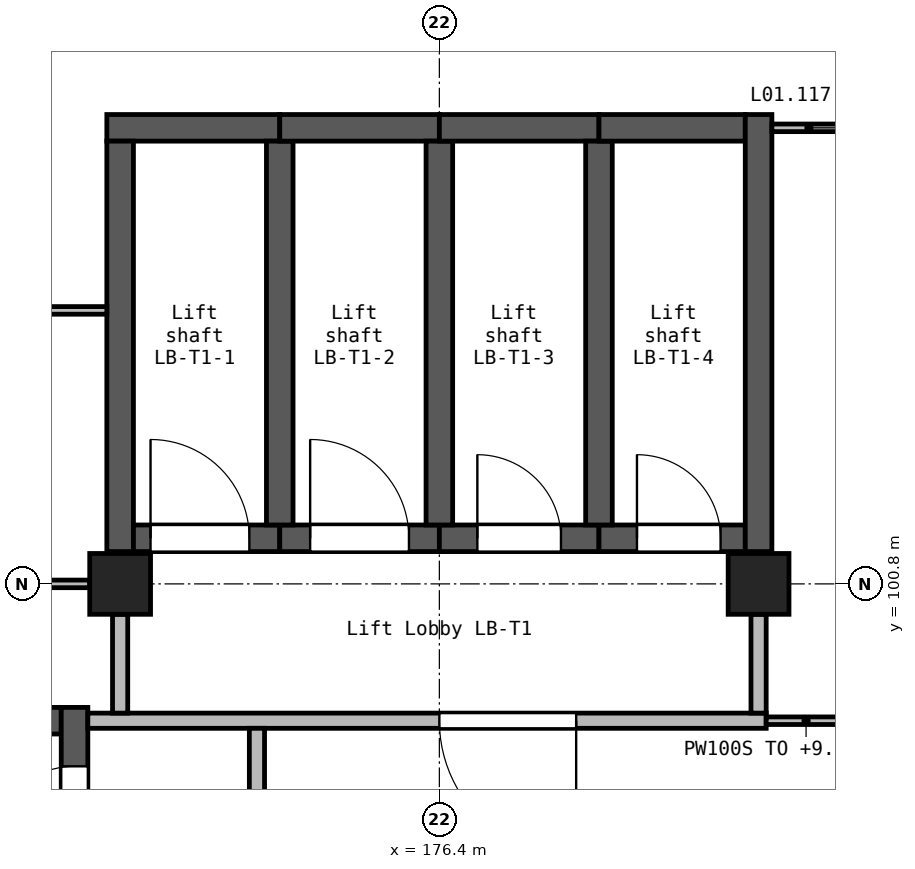
"""IFC4 building model, lengths in metres.
Left out: names, types, materials, properties, quantities, classifications, styles, units other than length and angle.
Written with IfcOpenShell. Run it as: python <this file> out.ifc"""

import sys

from ifc_helpers import new_model, si_unit, direction, frame, frame_2d, origin, origin_2d, place, context, subcontext, project, spatial, rectangle, extrude, element, fill, save


model = new_model("IFC4")
c1 = context("Model", 3, precision=1e-05, world=origin(), true_north=direction((0.0, 1.0)))
c2 = subcontext(c1, "Body", "Model", "MODEL_VIEW")
j1 = project(units=[si_unit("LENGTHUNIT", "METRE"), si_unit("PLANEANGLEUNIT", "RADIAN")], contexts=[c1])
p1 = place(None, origin())
s1 = spatial("IfcSite", under=j1, at=p1, CompositionType="ELEMENT")
p2 = place(p1, origin())
s2 = spatial("IfcBuilding", under=s1, at=p2, CompositionType="ELEMENT")
p3 = place(p2, frame((0.0, 0.0, 5.4)))
s3 = spatial("IfcBuildingStorey", under=s2, at=p3, CompositionType="ELEMENT", Elevation=5.4)
for number, where, z_axis, x_axis in (
    (1, (172.2, 100.8, 0.0), (0.0, 0.0, 1.0), (1.0, 0.0, 0.0)),
    (2, (180.6, 100.8, 0.0), (0.0, 0.0, 1.0), (1.0, 0.0, 0.0)),
):
    element("IfcColumn", number, at=place(p3, frame(where, z_axis=z_axis, x_axis=x_axis)), inside=s3, PredefinedType="COLUMN", context=c2, shape_type="SweptSolid", body=[
        extrude(rectangle(XDim=0.8, YDim=0.8, at=origin_2d()), origin(), (0.0, 0.0, 1.0), 4.5),
    ])
p4 = place(p3, frame((163.625, 99.0, 0.0), z_axis=(0.0, 0.0, 1.0), x_axis=(1.0, 0.0, 0.0)))
e3 = element("IfcWall", 3, at=p4, inside=s3, PredefinedType="SHEAR", context=c2, shape_type="SweptSolid", body=[
    extrude(rectangle(XDim=7.8, YDim=0.35, at=frame_2d((3.9, 0.0))), origin(), (0.0, 0.0, 1.0), 4.5),
])
p5 = place(p3, frame((171.6, 94.025, 0.0), z_axis=(0.0, 0.0, 1.0), x_axis=(0.0, 1.0, 0.0)))
e4 = element("IfcWall", 4, at=p5, inside=s3, PredefinedType="SHEAR", context=c2, shape_type="SweptSolid", body=[
    extrude(rectangle(XDim=5.15, YDim=0.35, at=frame_2d((2.575, 0.0))), origin(), (0.0, 0.0, 1.0), 4.5),
])
p6 = place(p5, frame((3.275, 0.0, 0.0)))
e5 = element("IfcOpeningElement", 5, at=p6, cuts=e4, PredefinedType="OPENING", context=c2, shape_type="SweptSolid", body=[
    extrude(rectangle(XDim=1.1, YDim=2.1, at=frame_2d((0.55, 1.05))), frame((0.0, 0.185, 0.0), z_axis=(0.0, -1.0, 0.0), x_axis=(1.0, 0.0, 0.0)), (0.0, 0.0, 1.0), 0.37),
])
p7 = place(p3, frame((172.025, 106.8, 0.0), z_axis=(0.0, 0.0, 1.0), x_axis=(1.0, 0.0, 0.0)))
e6 = element("IfcWall", 6, at=p7, inside=s3, PredefinedType="SHEAR", context=c2, shape_type="SweptSolid", body=[
    extrude(rectangle(XDim=2.275, YDim=0.35, at=frame_2d((1.138, 0.0))), origin(), (0.0, 0.0, 1.0), 4.5),
])
p8 = place(p3, frame((172.2, 101.225, 0.0), z_axis=(0.0, 0.0, 1.0), x_axis=(0.0, 1.0, 0.0)))
e7 = element("IfcWall", 7, at=p8, inside=s3, PredefinedType="SHEAR", context=c2, shape_type="SweptSolid", body=[
    extrude(rectangle(XDim=5.4, YDim=0.35, at=frame_2d((2.7, 0.0))), origin(), (0.0, 0.0, 1.0), 4.5),
])
p9 = place(p3, frame((172.375, 101.4, 0.0), z_axis=(0.0, 0.0, 1.0), x_axis=(1.0, 0.0, 0.0)))
e8 = element("IfcWall", 8, at=p9, inside=s3, PredefinedType="SHEAR", context=c2, shape_type="SweptSolid", body=[
    extrude(rectangle(XDim=1.925, YDim=0.35, at=frame_2d((0.962, 0.0))), origin(), (0.0, 0.0, 1.0), 4.5),
])
p10 = place(p9, frame((0.225, 0.0, 0.0)))
e9 = element("IfcOpeningElement", 9, at=p10, cuts=e8, PredefinedType="OPENING", context=c2, shape_type="SweptSolid", body=[
    extrude(rectangle(XDim=1.3, YDim=2.1, at=frame_2d((0.65, 1.05))), frame((0.0, 0.185, 0.0), z_axis=(0.0, -1.0, 0.0), x_axis=(1.0, 0.0, 0.0)), (0.0, 0.0, 1.0), 0.37),
])
p11 = place(p3, frame((174.3, 101.4, 0.0), z_axis=(0.0, 0.0, 1.0), x_axis=(1.0, 0.0, 0.0)))
e10 = element("IfcWall", 10, at=p11, inside=s3, PredefinedType="SHEAR", context=c2, shape_type="SweptSolid", body=[
    extrude(rectangle(XDim=2.1, YDim=0.35, at=frame_2d((1.05, 0.0))), origin(), (0.0, 0.0, 1.0), 4.5),
])
p12 = place(p11, frame((0.4, 0.0, 0.0)))
e11 = element("IfcOpeningElement", 11, at=p12, cuts=e10, PredefinedType="OPENING", context=c2, shape_type="SweptSolid", body=[
    extrude(rectangle(XDim=1.3, YDim=2.1, at=frame_2d((0.65, 1.05))), frame((0.0, 0.185, 0.0), z_axis=(0.0, -1.0, 0.0), x_axis=(1.0, 0.0, 0.0)), (0.0, 0.0, 1.0), 0.37),
])
p13 = place(p3, frame((174.3, 101.575, 0.0), z_axis=(0.0, 0.0, 1.0), x_axis=(0.0, 1.0, 0.0)))
e12 = element("IfcWall", 12, at=p13, inside=s3, PredefinedType="SHEAR", context=c2, shape_type="SweptSolid", body=[
    extrude(rectangle(XDim=5.05, YDim=0.35, at=frame_2d((2.525, 0.0))), origin(), (0.0, 0.0, 1.0), 4.5),
])
p14 = place(p3, frame((174.3, 106.8, 0.0), z_axis=(0.0, 0.0, 1.0), x_axis=(1.0, 0.0, 0.0)))
e13 = element("IfcWall", 13, at=p14, inside=s3, PredefinedType="SHEAR", context=c2, shape_type="SweptSolid", body=[
    extrude(rectangle(XDim=2.1, YDim=0.35, at=frame_2d((1.05, 0.0))), origin(), (0.0, 0.0, 1.0), 4.5),
])
p15 = place(p3, frame((176.4, 101.4, 0.0), z_axis=(0.0, 0.0, 1.0), x_axis=(1.0, 0.0, 0.0)))
e14 = element("IfcWall", 14, at=p15, inside=s3, PredefinedType="SHEAR", context=c2, shape_type="SweptSolid", body=[
    extrude(rectangle(XDim=2.1, YDim=0.35, at=frame_2d((1.05, 0.0))), origin(), (0.0, 0.0, 1.0), 4.5),
])
p16 = place(p15, frame((0.5, 0.0, 0.0)))
e15 = element("IfcOpeningElement", 15, at=p16, cuts=e14, PredefinedType="OPENING", context=c2, shape_type="SweptSolid", body=[
    extrude(rectangle(XDim=1.1, YDim=2.1, at=frame_2d((0.55, 1.05))), frame((0.0, 0.185, 0.0), z_axis=(0.0, -1.0, 0.0), x_axis=(1.0, 0.0, 0.0)), (0.0, 0.0, 1.0), 0.37),
])
p17 = place(p3, frame((176.4, 101.575, 0.0), z_axis=(0.0, 0.0, 1.0), x_axis=(0.0, 1.0, 0.0)))
e16 = element("IfcWall", 16, at=p17, inside=s3, PredefinedType="SHEAR", context=c2, shape_type="SweptSolid", body=[
    extrude(rectangle(XDim=5.05, YDim=0.35, at=frame_2d((2.525, 0.0))), origin(), (0.0, 0.0, 1.0), 4.5),
])
p18 = place(p3, frame((176.4, 106.8, 0.0), z_axis=(0.0, 0.0, 1.0), x_axis=(1.0, 0.0, 0.0)))
e17 = element("IfcWall", 17, at=p18, inside=s3, PredefinedType="SHEAR", context=c2, shape_type="SweptSolid", body=[
    extrude(rectangle(XDim=2.1, YDim=0.35, at=frame_2d((1.05, 0.0))), origin(), (0.0, 0.0, 1.0), 4.5),
])
p19 = place(p3, frame((178.5, 101.4, 0.0), z_axis=(0.0, 0.0, 1.0), x_axis=(1.0, 0.0, 0.0)))
e18 = element("IfcWall", 18, at=p19, inside=s3, PredefinedType="SHEAR", context=c2, shape_type="SweptSolid", body=[
    extrude(rectangle(XDim=1.925, YDim=0.35, at=frame_2d((0.962, 0.0))), origin(), (0.0, 0.0, 1.0), 4.5),
])
p20 = place(p19, frame((0.5, 0.0, 0.0)))
e19 = element("IfcOpeningElement", 19, at=p20, cuts=e18, PredefinedType="OPENING", context=c2, shape_type="SweptSolid", body=[
    extrude(rectangle(XDim=1.1, YDim=2.1, at=frame_2d((0.55, 1.05))), frame((0.0, 0.185, 0.0), z_axis=(0.0, -1.0, 0.0), x_axis=(1.0, 0.0, 0.0)), (0.0, 0.0, 1.0), 0.37),
])
p21 = place(p3, frame((178.5, 101.575, 0.0), z_axis=(0.0, 0.0, 1.0), x_axis=(0.0, 1.0, 0.0)))
e20 = element("IfcWall", 20, at=p21, inside=s3, PredefinedType="SHEAR", context=c2, shape_type="SweptSolid", body=[
    extrude(rectangle(XDim=5.05, YDim=0.35, at=frame_2d((2.525, 0.0))), origin(), (0.0, 0.0, 1.0), 4.5),
])
p22 = place(p3, frame((178.5, 106.8, 0.0), z_axis=(0.0, 0.0, 1.0), x_axis=(1.0, 0.0, 0.0)))
e21 = element("IfcWall", 21, at=p22, inside=s3, PredefinedType="SHEAR", context=c2, shape_type="SweptSolid", body=[
    extrude(rectangle(XDim=1.925, YDim=0.35, at=frame_2d((0.962, 0.0))), origin(), (0.0, 0.0, 1.0), 4.5),
])
p23 = place(p3, frame((180.6, 101.225, 0.0), z_axis=(0.0, 0.0, 1.0), x_axis=(0.0, 1.0, 0.0)))
e22 = element("IfcWall", 22, at=p23, inside=s3, PredefinedType="SHEAR", context=c2, shape_type="SweptSolid", body=[
    extrude(rectangle(XDim=5.75, YDim=0.35, at=frame_2d((2.875, 0.0))), origin(), (0.0, 0.0, 1.0), 4.5),
])
p24 = place(p3, frame((180.7, 99.0, 0.0), z_axis=(0.0, 0.0, 1.0), x_axis=(-1.0, 0.0, 0.0)))
e23 = element("IfcWall", 23, at=p24, inside=s3, PredefinedType="SOLIDWALL", context=c2, shape_type="SweptSolid", body=[
    extrude(rectangle(XDim=8.925, YDim=0.2, at=frame_2d((4.462, 0.0))), origin(), (0.0, 0.0, 1.0), 4.25),
])
p25 = place(p24, frame((2.5, 0.0, 0.0)))
e24 = element("IfcOpeningElement", 24, at=p25, cuts=e23, PredefinedType="OPENING", context=c2, shape_type="SweptSolid", body=[
    extrude(rectangle(XDim=1.8, YDim=2.1, at=frame_2d((0.9, 1.05))), frame((0.0, 0.11, 0.0), z_axis=(0.0, -1.0, 0.0), x_axis=(1.0, 0.0, 0.0)), (0.0, 0.0, 1.0), 0.22),
])
p26 = place(p3, frame((174.0, 94.1, 0.0), z_axis=(0.0, 0.0, 1.0), x_axis=(0.0, 1.0, 0.0)))
e25 = element("IfcWall", 25, at=p26, inside=s3, PredefinedType="SOLIDWALL", context=c2, shape_type="SweptSolid", body=[
    extrude(rectangle(XDim=4.8, YDim=0.2, at=frame_2d((2.4, 0.0))), origin(), (0.0, 0.0, 1.0), 4.25),
])
p27 = place(p26, frame((1.95, 0.0, 0.0)))
e26 = element("IfcOpeningElement", 26, at=p27, cuts=e25, PredefinedType="OPENING", context=c2, shape_type="SweptSolid", body=[
    extrude(rectangle(XDim=1.1, YDim=2.1, at=frame_2d((0.55, 1.05))), frame((0.0, 0.11, 0.0), z_axis=(0.0, -1.0, 0.0), x_axis=(1.0, 0.0, 0.0)), (0.0, 0.0, 1.0), 0.22),
])
for number, where, z_axis, x_axis in (
    (27, (172.2, 99.1, 0.0), (0.0, 0.0, 1.0), (0.0, 1.0, 0.0)),
    (28, (180.6, 99.1, 0.0), (0.0, 0.0, 1.0), (0.0, 1.0, 0.0)),
):
    element("IfcWall", number, at=place(p3, frame(where, z_axis=z_axis, x_axis=x_axis)), inside=s3, PredefinedType="SOLIDWALL", context=c2, shape_type="SweptSolid", body=[
        extrude(rectangle(XDim=1.3, YDim=0.2, at=frame_2d((0.65, 0.0))), origin(), (0.0, 0.0, 1.0), 4.25),
    ])
p28 = place(p3, frame((180.775, 106.8, 0.0), z_axis=(0.0, 0.0, 1.0), x_axis=(1.0, 0.0, 0.0)))
e29 = element("IfcWall", 29, at=p28, inside=s3, PredefinedType="PARTITIONING", context=c2, shape_type="SweptSolid", body=[
    extrude(rectangle(XDim=0.975, YDim=0.1, at=frame_2d((0.488, 0.0))), origin(), (0.0, 0.0, 1.0), 4.25),
])
p29 = place(p3, frame((164.55, 100.8, 0.0), z_axis=(0.0, 0.0, 1.0), x_axis=(1.0, 0.0, 0.0)))
e30 = element("IfcWall", 30, at=p29, inside=s3, PredefinedType="PARTITIONING", context=c2, shape_type="SweptSolid", body=[
    extrude(rectangle(XDim=7.25, YDim=0.1, at=frame_2d((3.625, 0.0))), origin(), (0.0, 0.0, 1.0), 4.25),
])
p30 = place(p29, frame((3.0, 0.0, 0.0)))
e31 = element("IfcOpeningElement", 31, at=p30, cuts=e30, PredefinedType="OPENING", context=c2, shape_type="SweptSolid", body=[
    extrude(rectangle(XDim=0.9, YDim=2.1, at=frame_2d((0.45, 1.05))), frame((0.0, 0.06, 0.0), z_axis=(0.0, -1.0, 0.0), x_axis=(1.0, 0.0, 0.0)), (0.0, 0.0, 1.0), 0.12),
])
p31 = place(p3, frame((164.45, 104.398, 0.0), z_axis=(0.0, 0.0, 1.0), x_axis=(1.0, 0.0, 0.0)))
e32 = element("IfcWall", 32, at=p31, inside=s3, PredefinedType="PARTITIONING", context=c2, shape_type="SweptSolid", body=[
    extrude(rectangle(XDim=7.575, YDim=0.1, at=frame_2d((3.788, 0.0))), origin(), (0.0, 0.0, 1.0), 4.25),
])
p32 = place(p31, frame((3.1, 0.0, 0.0)))
e33 = element("IfcOpeningElement", 33, at=p32, cuts=e32, PredefinedType="OPENING", context=c2, shape_type="SweptSolid", body=[
    extrude(rectangle(XDim=0.9, YDim=2.1, at=frame_2d((0.45, 1.05))), frame((0.0, 0.06, 0.0), z_axis=(0.0, -1.0, 0.0), x_axis=(1.0, 0.0, 0.0)), (0.0, 0.0, 1.0), 0.12),
])
p33 = place(p3, frame((180.7, 99.0, 0.0), z_axis=(0.0, 0.0, 1.0), x_axis=(1.0, 0.0, 0.0)))
e34 = element("IfcWall", 34, at=p33, inside=s3, PredefinedType="PARTITIONING", context=c2, shape_type="SweptSolid", body=[
    extrude(rectangle(XDim=1.05, YDim=0.1, at=frame_2d((0.525, 0.0))), origin(), (0.0, 0.0, 1.0), 4.25),
])
p34 = place(p10, origin())
e35 = element("IfcDoor", 35, at=p34, inside=s3, OperationType="DOUBLE_DOOR_SLIDING", PredefinedType="DOOR", context=c2, shape_type="SweptSolid", body=[
    extrude(rectangle(XDim=1.3, YDim=2.1, at=frame_2d((0.65, 1.05))), frame((0.0, 0.025, 0.0), z_axis=(0.0, -1.0, 0.0), x_axis=(1.0, 0.0, 0.0)), (0.0, 0.0, 1.0), 0.05),
])
fill(e9, e35)
p35 = place(p12, origin())
e36 = element("IfcDoor", 36, at=p35, inside=s3, OperationType="DOUBLE_DOOR_SLIDING", PredefinedType="DOOR", context=c2, shape_type="SweptSolid", body=[
    extrude(rectangle(XDim=1.3, YDim=2.1, at=frame_2d((0.65, 1.05))), frame((0.0, 0.025, 0.0), z_axis=(0.0, -1.0, 0.0), x_axis=(1.0, 0.0, 0.0)), (0.0, 0.0, 1.0), 0.05),
])
fill(e11, e36)
p36 = place(p16, origin())
e37 = element("IfcDoor", 37, at=p36, inside=s3, OperationType="DOUBLE_DOOR_SLIDING", PredefinedType="DOOR", context=c2, shape_type="SweptSolid", body=[
    extrude(rectangle(XDim=1.1, YDim=2.1, at=frame_2d((0.55, 1.05))), frame((0.0, 0.025, 0.0), z_axis=(0.0, -1.0, 0.0), x_axis=(1.0, 0.0, 0.0)), (0.0, 0.0, 1.0), 0.05),
])
fill(e15, e37)
p37 = place(p20, origin())
e38 = element("IfcDoor", 38, at=p37, inside=s3, OperationType="DOUBLE_DOOR_SLIDING", PredefinedType="DOOR", context=c2, shape_type="SweptSolid", body=[
    extrude(rectangle(XDim=1.1, YDim=2.1, at=frame_2d((0.55, 1.05))), frame((0.0, 0.025, 0.0), z_axis=(0.0, -1.0, 0.0), x_axis=(1.0, 0.0, 0.0)), (0.0, 0.0, 1.0), 0.05),
])
fill(e19, e38)
p38 = place(p6, origin())
e39 = element("IfcDoor", 39, at=p38, inside=s3, OperationType="SINGLE_SWING_RIGHT", PredefinedType="DOOR", context=c2, shape_type="SweptSolid", body=[
    extrude(rectangle(XDim=1.1, YDim=2.1, at=frame_2d((0.55, 1.05))), frame((0.0, 0.025, 0.0), z_axis=(0.0, -1.0, 0.0), x_axis=(1.0, 0.0, 0.0)), (0.0, 0.0, 1.0), 0.05),
])
fill(e5, e39)
p39 = place(p25, frame((1.8, 0.0, 0.0), z_axis=(0.0, 0.0, 1.0), x_axis=(-1.0, 0.0, 0.0)))
e40 = element("IfcDoor", 40, at=p39, inside=s3, OperationType="DOUBLE_DOOR_SINGLE_SWING", PredefinedType="DOOR", context=c2, shape_type="SweptSolid", body=[
    extrude(rectangle(XDim=1.8, YDim=2.1, at=frame_2d((0.9, 1.05))), frame((0.0, 0.025, 0.0), z_axis=(0.0, -1.0, 0.0), x_axis=(1.0, 0.0, 0.0)), (0.0, 0.0, 1.0), 0.05),
])
fill(e24, e40)
save(model, sys.argv[1])
